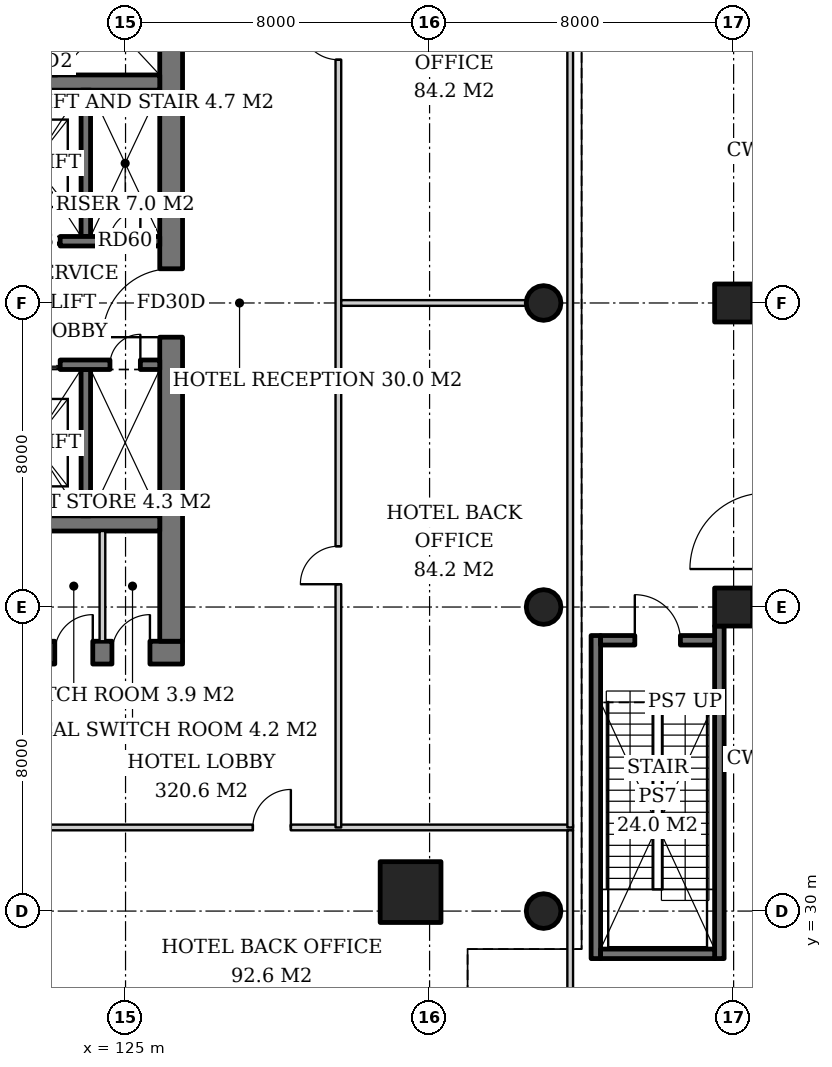
"""IFC4 building model, lengths in metres.
Left out: names, types, materials, properties, quantities, classifications, styles, units other than length and angle.
Written with IfcOpenShell. Run it as: python <this file> out.ifc"""

import sys

from ifc_helpers import new_model, si_unit, direction, frame, frame_2d, origin, origin_2d, place, context, subcontext, project, spatial, rectangle, hollow_circle, extrude, element, fill, save


model = new_model("IFC4")
c1 = context("Model", 3, precision=1e-05, world=origin(), true_north=direction((0.0, 1.0)))
c2 = subcontext(c1, "Body", "Model", "MODEL_VIEW")
j1 = project(units=[si_unit("LENGTHUNIT", "METRE"), si_unit("PLANEANGLEUNIT", "RADIAN")], contexts=[c1])
p1 = place(None, origin())
s1 = spatial("IfcSite", under=j1, at=p1, CompositionType="ELEMENT")
p2 = place(p1, origin())
s2 = spatial("IfcBuilding", under=s1, at=p2, CompositionType="ELEMENT")
p3 = place(p2, origin())
s3 = spatial("IfcBuildingStorey", under=s2, at=p3, CompositionType="ELEMENT", Elevation=0.0)
for number, where, z_axis, x_axis in (
    (1, (141.0, 38.0, 0.0), (0.0, 0.0, 1.0), (1.0, 0.0, 0.0)),
    (2, (141.0, 46.0, 0.0), (0.0, 0.0, 1.0), (1.0, 0.0, 0.0)),
):
    element("IfcColumn", number, at=place(p3, frame(where, z_axis=z_axis, x_axis=x_axis)), inside=s3, PredefinedType="COLUMN", context=c2, shape_type="SweptSolid", body=[
        extrude(rectangle(XDim=1.0, YDim=1.0, at=origin_2d()), origin(), (0.0, 0.0, 1.0), 6.0),
    ])
for number, where, z_axis, x_axis in (
    (3, (136.0, 30.0, 0.0), (0.0, 0.0, 1.0), (1.0, 0.0, 0.0)),
    (4, (136.0, 38.0, 0.0), (0.0, 0.0, 1.0), (1.0, 0.0, 0.0)),
    (5, (136.0, 46.0, 0.0), (0.0, 0.0, 1.0), (1.0, 0.0, 0.0)),
):
    element("IfcColumn", number, at=place(p3, frame(where, z_axis=z_axis, x_axis=x_axis)), inside=s3, PredefinedType="COLUMN", context=c2, shape_type="SweptSolid", body=[
        extrude(hollow_circle(Radius=0.457, WallThickness=0.03, at=origin_2d()), origin(), (0.0, 0.0, 1.0), 6.0),
    ])
p4 = place(p3, frame((132.5, 30.5, 0.0), z_axis=(0.0, 0.0, 1.0), x_axis=(1.0, 0.0, 0.0)))
e6 = element("IfcColumn", 6, at=p4, inside=s3, PredefinedType="COLUMN", context=c2, shape_type="SweptSolid", body=[
    extrude(rectangle(XDim=1.6, YDim=1.6, at=origin_2d()), origin(), (0.0, 0.0, 1.0), 6.0),
])
p5 = place(p3, frame((107.5, 36.8, 0.0), z_axis=(0.0, 0.0, 1.0), x_axis=(1.0, 0.0, 0.0)))
e7 = element("IfcWall", 7, at=p5, inside=s3, PredefinedType="SHEAR", context=c2, shape_type="SweptSolid", body=[
    extrude(rectangle(XDim=19.0, YDim=0.6, at=frame_2d((9.5, 0.0))), origin(), (0.0, 0.0, 1.0), 6.0),
])
p6 = place(p5, frame((3.9, 0.0, 0.0)))
e8 = element("IfcOpeningElement", 8, at=p6, cuts=e7, PredefinedType="OPENING", context=c2, shape_type="SweptSolid", body=[
    extrude(rectangle(XDim=1.0, YDim=2.1, at=frame_2d((0.5, 1.05))), frame((0.0, 0.31, 0.0), z_axis=(0.0, -1.0, 0.0), x_axis=(1.0, 0.0, 0.0)), (0.0, 0.0, 1.0), 0.62),
])
p7 = place(p5, frame((14.107, 0.0, 0.0)))
e9 = element("IfcOpeningElement", 9, at=p7, cuts=e7, PredefinedType="OPENING", context=c2, shape_type="SweptSolid", body=[
    extrude(rectangle(XDim=1.0, YDim=2.1, at=frame_2d((0.5, 1.05))), frame((0.0, 0.31, 0.0), z_axis=(0.0, -1.0, 0.0), x_axis=(1.0, 0.0, 0.0)), (0.0, 0.0, 1.0), 0.62),
])
p8 = place(p5, frame((15.638, 0.0, 0.0)))
e10 = element("IfcOpeningElement", 10, at=p8, cuts=e7, PredefinedType="OPENING", context=c2, shape_type="SweptSolid", body=[
    extrude(rectangle(XDim=1.0, YDim=2.1, at=frame_2d((0.5, 1.05))), frame((0.0, 0.31, 0.0), z_axis=(0.0, -1.0, 0.0), x_axis=(1.0, 0.0, 0.0)), (0.0, 0.0, 1.0), 0.62),
])
p9 = place(p5, frame((17.142, 0.0, 0.0)))
e11 = element("IfcOpeningElement", 11, at=p9, cuts=e7, PredefinedType="OPENING", context=c2, shape_type="SweptSolid", body=[
    extrude(rectangle(XDim=1.0, YDim=2.1, at=frame_2d((0.5, 1.05))), frame((0.0, 0.31, 0.0), z_axis=(0.0, -1.0, 0.0), x_axis=(1.0, 0.0, 0.0)), (0.0, 0.0, 1.0), 0.62),
])
p10 = place(p3, frame((126.2, 37.1, 0.0), z_axis=(0.0, 0.0, 1.0), x_axis=(0.0, 1.0, 0.0)))
e12 = element("IfcWall", 12, at=p10, inside=s3, PredefinedType="SHEAR", context=c2, shape_type="SweptSolid", body=[
    extrude(rectangle(XDim=17.8, YDim=0.6, at=frame_2d((8.9, 0.0))), origin(), (0.0, 0.0, 1.0), 6.0),
])
p11 = place(p10, frame((8.0, 0.0, 0.0)))
e13 = element("IfcOpeningElement", 13, at=p11, cuts=e12, PredefinedType="OPENING", context=c2, shape_type="SweptSolid", body=[
    extrude(rectangle(XDim=1.8, YDim=2.4, at=frame_2d((0.9, 1.2))), frame((0.0, 0.31, 0.0), z_axis=(0.0, -1.0, 0.0), x_axis=(1.0, 0.0, 0.0)), (0.0, 0.0, 1.0), 0.62),
])
for number, where, z_axis, x_axis in (
    (14, (108.1, 40.2, 0.0), (0.0, 0.0, 1.0), (1.0, 0.0, 0.0)),
    (15, (108.1, 51.8, 0.0), (0.0, 0.0, 1.0), (1.0, 0.0, 0.0)),
):
    element("IfcWall", number, at=place(p3, frame(where, z_axis=z_axis, x_axis=x_axis)), inside=s3, PredefinedType="SHEAR", context=c2, shape_type="SweptSolid", body=[
        extrude(rectangle(XDim=17.8, YDim=0.4, at=frame_2d((8.9, 0.0))), origin(), (0.0, 0.0, 1.0), 6.0),
    ])
p12 = place(p3, frame((123.075, 52.0, 0.0), z_axis=(0.0, 0.0, 1.0), x_axis=(0.0, 1.0, 0.0)))
e16 = element("IfcWall", 16, at=p12, inside=s3, PredefinedType="SHEAR", context=c2, shape_type="SweptSolid", body=[
    extrude(rectangle(XDim=2.9, YDim=0.25, at=frame_2d((1.45, 0.0))), origin(), (0.0, 0.0, 1.0), 6.0),
])
p13 = place(p12, frame((0.8, 0.0, 0.0)))
e17 = element("IfcOpeningElement", 17, at=p13, cuts=e16, PredefinedType="OPENING", context=c2, shape_type="SweptSolid", body=[
    extrude(rectangle(XDim=1.3, YDim=2.2, at=frame_2d((0.65, 1.1))), frame((0.0, 0.135, 0.0), z_axis=(0.0, -1.0, 0.0), x_axis=(1.0, 0.0, 0.0)), (0.0, 0.0, 1.0), 0.27),
])
p14 = place(p3, frame((123.955, 47.75, 0.0), z_axis=(0.0, 0.0, 1.0), x_axis=(0.0, 1.0, 0.0)))
e18 = element("IfcWall", 18, at=p14, inside=s3, PredefinedType="SHEAR", context=c2, shape_type="SweptSolid", body=[
    extrude(rectangle(XDim=3.85, YDim=0.25, at=frame_2d((1.925, 0.0))), origin(), (0.0, 0.0, 1.0), 6.0),
])
p15 = place(p3, frame((121.33, 47.625, 0.0), z_axis=(0.0, 0.0, 1.0), x_axis=(1.0, 0.0, 0.0)))
e19 = element("IfcWall", 19, at=p15, inside=s3, PredefinedType="SHEAR", context=c2, shape_type="SweptSolid", body=[
    extrude(rectangle(XDim=4.57, YDim=0.25, at=frame_2d((2.285, 0.0))), origin(), (0.0, 0.0, 1.0), 6.0),
])
p16 = place(p15, frame((0.55, 0.0, 0.0)))
e20 = element("IfcOpeningElement", 20, at=p16, cuts=e19, PredefinedType="OPENING", context=c2, shape_type="SweptSolid", body=[
    extrude(rectangle(XDim=1.4, YDim=2.4, at=frame_2d((0.7, 1.2))), frame((0.0, 0.135, 0.0), z_axis=(0.0, -1.0, 0.0), x_axis=(1.0, 0.0, 0.0)), (0.0, 0.0, 1.0), 0.27),
])
p17 = place(p15, frame((3.26, 0.0, 0.0)))
e21 = element("IfcOpeningElement", 21, at=p17, cuts=e19, PredefinedType="OPENING", context=c2, shape_type="SweptSolid", body=[
    extrude(rectangle(XDim=0.8, YDim=2.0, at=frame_2d((0.4, 1.0))), frame((0.0, 0.135, 0.0), z_axis=(0.0, -1.0, 0.0), x_axis=(1.0, 0.0, 0.0)), (0.0, 0.0, 1.0), 0.27),
])
p18 = place(p3, frame((123.955, 44.25, 0.0), z_axis=(0.0, 0.0, 1.0), x_axis=(0.0, -1.0, 0.0)))
e22 = element("IfcWall", 22, at=p18, inside=s3, PredefinedType="SHEAR", context=c2, shape_type="SweptSolid", body=[
    extrude(rectangle(XDim=3.85, YDim=0.25, at=frame_2d((1.925, 0.0))), origin(), (0.0, 0.0, 1.0), 6.0),
])
p19 = place(p3, frame((121.33, 44.375, 0.0), z_axis=(0.0, 0.0, 1.0), x_axis=(1.0, 0.0, 0.0)))
e23 = element("IfcWall", 23, at=p19, inside=s3, PredefinedType="SHEAR", context=c2, shape_type="SweptSolid", body=[
    extrude(rectangle(XDim=4.57, YDim=0.25, at=frame_2d((2.285, 0.0))), origin(), (0.0, 0.0, 1.0), 6.0),
])
p20 = place(p19, frame((0.55, 0.0, 0.0)))
e24 = element("IfcOpeningElement", 24, at=p20, cuts=e23, PredefinedType="OPENING", context=c2, shape_type="SweptSolid", body=[
    extrude(rectangle(XDim=1.4, YDim=2.4, at=frame_2d((0.7, 1.2))), frame((0.0, 0.135, 0.0), z_axis=(0.0, -1.0, 0.0), x_axis=(1.0, 0.0, 0.0)), (0.0, 0.0, 1.0), 0.27),
])
p21 = place(p19, frame((3.26, 0.0, 0.0)))
e25 = element("IfcOpeningElement", 25, at=p21, cuts=e23, PredefinedType="OPENING", context=c2, shape_type="SweptSolid", body=[
    extrude(rectangle(XDim=0.8, YDim=2.0, at=frame_2d((0.4, 1.0))), frame((0.0, 0.135, 0.0), z_axis=(0.0, -1.0, 0.0), x_axis=(1.0, 0.0, 0.0)), (0.0, 0.0, 1.0), 0.27),
])
p22 = place(p3, frame((124.392, 37.1, 0.0), z_axis=(0.0, 0.0, 1.0), x_axis=(0.0, 1.0, 0.0)))
e26 = element("IfcWall", 26, at=p22, inside=s3, PredefinedType="SOLIDWALL", context=c2, shape_type="SweptSolid", body=[
    extrude(rectangle(XDim=2.9, YDim=0.15, at=frame_2d((1.45, 0.0))), origin(), (0.0, 0.0, 1.0), 5.7),
])
p23 = place(p3, frame((137.375, 28.75, 0.0), z_axis=(0.0, 0.0, 1.0), x_axis=(0.0, 1.0, 0.0)))
e27 = element("IfcWall", 27, at=p23, inside=s3, PredefinedType="SOLIDWALL", context=c2, shape_type="SweptSolid", body=[
    extrude(rectangle(XDim=8.5, YDim=0.25, at=frame_2d((4.25, 0.0))), origin(), (0.0, 0.0, 1.0), 5.7),
])
p24 = place(p3, frame((140.625, 28.75, 0.0), z_axis=(0.0, 0.0, 1.0), x_axis=(0.0, 1.0, 0.0)))
e28 = element("IfcWall", 28, at=p24, inside=s3, PredefinedType="SOLIDWALL", context=c2, shape_type="SweptSolid", body=[
    extrude(rectangle(XDim=8.75, YDim=0.25, at=frame_2d((4.375, 0.0))), origin(), (0.0, 0.0, 1.0), 5.7),
])
p25 = place(p3, frame((137.5, 28.875, 0.0), z_axis=(0.0, 0.0, 1.0), x_axis=(1.0, 0.0, 0.0)))
e29 = element("IfcWall", 29, at=p25, inside=s3, PredefinedType="SOLIDWALL", context=c2, shape_type="SweptSolid", body=[
    extrude(rectangle(XDim=3.0, YDim=0.25, at=frame_2d((1.5, 0.0))), origin(), (0.0, 0.0, 1.0), 5.7),
])
p26 = place(p3, frame((137.5, 37.125, 0.0), z_axis=(0.0, 0.0, 1.0), x_axis=(1.0, 0.0, 0.0)))
e30 = element("IfcWall", 30, at=p26, inside=s3, PredefinedType="SOLIDWALL", context=c2, shape_type="SweptSolid", body=[
    extrude(rectangle(XDim=3.0, YDim=0.25, at=frame_2d((1.5, 0.0))), origin(), (0.0, 0.0, 1.0), 5.7),
])
p27 = place(p26, frame((0.9, 0.0, 0.0)))
e31 = element("IfcOpeningElement", 31, at=p27, cuts=e30, PredefinedType="OPENING", context=c2, shape_type="SweptSolid", body=[
    extrude(rectangle(XDim=1.2, YDim=2.1, at=frame_2d((0.6, 1.05))), frame((0.0, 0.135, 0.0), z_axis=(0.0, -1.0, 0.0), x_axis=(1.0, 0.0, 0.0)), (0.0, 0.0, 1.0), 0.27),
])
p28 = place(p3, frame((113.075, 32.2, 0.0), z_axis=(0.0, 0.0, 1.0), x_axis=(1.0, 0.0, 0.0)))
e32 = element("IfcWall", 32, at=p28, inside=s3, PredefinedType="PARTITIONING", context=c2, shape_type="SweptSolid", body=[
    extrude(rectangle(XDim=23.7, YDim=0.15, at=frame_2d((11.85, 0.0))), origin(), (0.0, 0.0, 1.0), 4.947),
])
p29 = place(p28, frame((3.425, 0.0, 0.0)))
e33 = element("IfcOpeningElement", 33, at=p29, cuts=e32, PredefinedType="OPENING", context=c2, shape_type="SweptSolid", body=[
    extrude(rectangle(XDim=1.0, YDim=2.1, at=frame_2d((0.5, 1.05))), frame((0.0, 0.085, 0.0), z_axis=(0.0, -1.0, 0.0), x_axis=(1.0, 0.0, 0.0)), (0.0, 0.0, 1.0), 0.17),
])
p30 = place(p28, frame((15.275, 0.0, 0.0)))
e34 = element("IfcOpeningElement", 34, at=p30, cuts=e32, PredefinedType="OPENING", context=c2, shape_type="SweptSolid", body=[
    extrude(rectangle(XDim=1.0, YDim=2.1, at=frame_2d((0.5, 1.05))), frame((0.0, 0.085, 0.0), z_axis=(0.0, -1.0, 0.0), x_axis=(1.0, 0.0, 0.0)), (0.0, 0.0, 1.0), 0.17),
])
p31 = place(p3, frame((136.7, 26.375, 0.0), z_axis=(0.0, 0.0, 1.0), x_axis=(0.0, 1.0, 0.0)))
e35 = element("IfcWall", 35, at=p31, inside=s3, PredefinedType="PARTITIONING", context=c2, shape_type="SweptSolid", body=[
    extrude(rectangle(XDim=5.75, YDim=0.15, at=frame_2d((2.875, 0.0))), origin(), (0.0, 0.0, 1.0), 5.7),
])
p32 = place(p3, frame((130.6, 32.2, 0.0), z_axis=(0.0, 0.0, 1.0), x_axis=(0.0, 1.0, 0.0)))
e36 = element("IfcWall", 36, at=p32, inside=s3, PredefinedType="PARTITIONING", context=c2, shape_type="SweptSolid", body=[
    extrude(rectangle(XDim=27.6, YDim=0.15, at=frame_2d((13.8, 0.0))), origin(), (0.0, 0.0, 1.0), 4.9),
])
p33 = place(p32, frame((6.4, 0.0, 0.0)))
e37 = element("IfcOpeningElement", 37, at=p33, cuts=e36, PredefinedType="OPENING", context=c2, shape_type="SweptSolid", body=[
    extrude(rectangle(XDim=1.0, YDim=2.1, at=frame_2d((0.5, 1.05))), frame((0.0, 0.085, 0.0), z_axis=(0.0, -1.0, 0.0), x_axis=(1.0, 0.0, 0.0)), (0.0, 0.0, 1.0), 0.17),
])
p34 = place(p32, frame((20.2, 0.0, 0.0)))
e38 = element("IfcOpeningElement", 38, at=p34, cuts=e36, PredefinedType="OPENING", context=c2, shape_type="SweptSolid", body=[
    extrude(rectangle(XDim=1.0, YDim=2.1, at=frame_2d((0.5, 1.05))), frame((0.0, 0.085, 0.0), z_axis=(0.0, -1.0, 0.0), x_axis=(1.0, 0.0, 0.0)), (0.0, 0.0, 1.0), 0.17),
])
p35 = place(p3, frame((136.7, 32.2, 0.0), z_axis=(0.0, 0.0, 1.0), x_axis=(0.0, 1.0, 0.0)))
e39 = element("IfcWall", 39, at=p35, inside=s3, PredefinedType="PARTITIONING", context=c2, shape_type="SweptSolid", body=[
    extrude(rectangle(XDim=27.6, YDim=0.15, at=frame_2d((13.8, 0.0))), origin(), (0.0, 0.0, 1.0), 5.7),
])
p36 = place(p3, frame((130.675, 46.0, 0.0), z_axis=(0.0, 0.0, 1.0), x_axis=(1.0, 0.0, 0.0)))
e40 = element("IfcWall", 40, at=p36, inside=s3, PredefinedType="PARTITIONING", context=c2, shape_type="SweptSolid", body=[
    extrude(rectangle(XDim=4.868, YDim=0.15, at=frame_2d((2.434, 0.0))), origin(), (0.0, 0.0, 1.0), 5.7),
])
p37 = place(p16, origin())
e41 = element("IfcDoor", 41, at=p37, inside=s3, OperationType="DOUBLE_DOOR_SLIDING", PredefinedType="DOOR", context=c2, shape_type="SweptSolid", body=[
    extrude(rectangle(XDim=1.4, YDim=2.4, at=frame_2d((0.7, 1.2))), frame((0.0, 0.025, 0.0), z_axis=(0.0, -1.0, 0.0), x_axis=(1.0, 0.0, 0.0)), (0.0, 0.0, 1.0), 0.05),
])
fill(e20, e41)
p38 = place(p17, origin())
e42 = element("IfcDoor", 42, at=p38, inside=s3, OperationType="SINGLE_SWING_RIGHT", PredefinedType="DOOR", context=c2, shape_type="SweptSolid", body=[
    extrude(rectangle(XDim=0.8, YDim=2.0, at=frame_2d((0.4, 1.0))), frame((0.0, 0.025, 0.0), z_axis=(0.0, -1.0, 0.0), x_axis=(1.0, 0.0, 0.0)), (0.0, 0.0, 1.0), 0.05),
])
fill(e21, e42)
p39 = place(p20, origin())
e43 = element("IfcDoor", 43, at=p39, inside=s3, OperationType="DOUBLE_DOOR_SLIDING", PredefinedType="DOOR", context=c2, shape_type="SweptSolid", body=[
    extrude(rectangle(XDim=1.4, YDim=2.4, at=frame_2d((0.7, 1.2))), frame((0.0, 0.025, 0.0), z_axis=(0.0, -1.0, 0.0), x_axis=(1.0, 0.0, 0.0)), (0.0, 0.0, 1.0), 0.05),
])
fill(e24, e43)
p40 = place(p21, origin())
e44 = element("IfcDoor", 44, at=p40, inside=s3, OperationType="SINGLE_SWING_RIGHT", PredefinedType="DOOR", context=c2, shape_type="SweptSolid", body=[
    extrude(rectangle(XDim=0.8, YDim=2.0, at=frame_2d((0.4, 1.0))), frame((0.0, 0.025, 0.0), z_axis=(0.0, -1.0, 0.0), x_axis=(1.0, 0.0, 0.0)), (0.0, 0.0, 1.0), 0.05),
])
fill(e25, e44)
p41 = place(p11, origin())
e45 = element("IfcDoor", 45, at=p41, inside=s3, OperationType="DOUBLE_DOOR_SINGLE_SWING", PredefinedType="DOOR", context=c2, shape_type="SweptSolid", body=[
    extrude(rectangle(XDim=1.8, YDim=2.4, at=frame_2d((0.9, 1.2))), frame((0.0, 0.025, 0.0), z_axis=(0.0, -1.0, 0.0), x_axis=(1.0, 0.0, 0.0)), (0.0, 0.0, 1.0), 0.05),
])
fill(e13, e45)
p42 = place(p8, origin())
e46 = element("IfcDoor", 46, at=p42, inside=s3, OperationType="SINGLE_SWING_RIGHT", PredefinedType="DOOR", context=c2, shape_type="SweptSolid", body=[
    extrude(rectangle(XDim=1.0, YDim=2.1, at=frame_2d((0.5, 1.05))), frame((0.0, 0.29, 0.0), z_axis=(0.0, -1.0, 0.0), x_axis=(1.0, 0.0, 0.0)), (0.0, 0.0, 1.0), 0.05),
])
fill(e10, e46)
p43 = place(p9, origin())
e47 = element("IfcDoor", 47, at=p43, inside=s3, OperationType="SINGLE_SWING_RIGHT", PredefinedType="DOOR", context=c2, shape_type="SweptSolid", body=[
    extrude(rectangle(XDim=1.0, YDim=2.1, at=frame_2d((0.5, 1.05))), frame((0.0, 0.29, 0.0), z_axis=(0.0, -1.0, 0.0), x_axis=(1.0, 0.0, 0.0)), (0.0, 0.0, 1.0), 0.05),
])
fill(e11, e47)
p44 = place(p27, origin())
e48 = element("IfcDoor", 48, at=p44, inside=s3, OperationType="SINGLE_SWING_LEFT", PredefinedType="DOOR", context=c2, shape_type="SweptSolid", body=[
    extrude(rectangle(XDim=1.2, YDim=2.1, at=frame_2d((0.6, 1.05))), frame((0.0, 0.025, 0.0), z_axis=(0.0, -1.0, 0.0), x_axis=(1.0, 0.0, 0.0)), (0.0, 0.0, 1.0), 0.05),
])
fill(e31, e48)
p45 = place(p30, origin())
e49 = element("IfcDoor", 49, at=p45, inside=s3, OperationType="SINGLE_SWING_RIGHT", PredefinedType="DOOR", context=c2, shape_type="SweptSolid", body=[
    extrude(rectangle(XDim=1.0, YDim=2.1, at=frame_2d((0.5, 1.05))), frame((0.0, 0.025, 0.0), z_axis=(0.0, -1.0, 0.0), x_axis=(1.0, 0.0, 0.0)), (0.0, 0.0, 1.0), 0.05),
])
fill(e34, e49)
p46 = place(p33, origin())
e50 = element("IfcDoor", 50, at=p46, inside=s3, OperationType="SINGLE_SWING_LEFT", PredefinedType="DOOR", context=c2, shape_type="SweptSolid", body=[
    extrude(rectangle(XDim=1.0, YDim=2.1, at=frame_2d((0.5, 1.05))), frame((0.0, 0.025, 0.0), z_axis=(0.0, -1.0, 0.0), x_axis=(1.0, 0.0, 0.0)), (0.0, 0.0, 1.0), 0.05),
])
fill(e37, e50)
p47 = place(p34, origin())
e51 = element("IfcDoor", 51, at=p47, inside=s3, OperationType="SINGLE_SWING_RIGHT", PredefinedType="DOOR", context=c2, shape_type="SweptSolid", body=[
    extrude(rectangle(XDim=1.0, YDim=2.1, at=frame_2d((0.5, 1.05))), frame((0.0, 0.025, 0.0), z_axis=(0.0, -1.0, 0.0), x_axis=(1.0, 0.0, 0.0)), (0.0, 0.0, 1.0), 0.05),
])
fill(e38, e51)
save(model, sys.argv[1])
